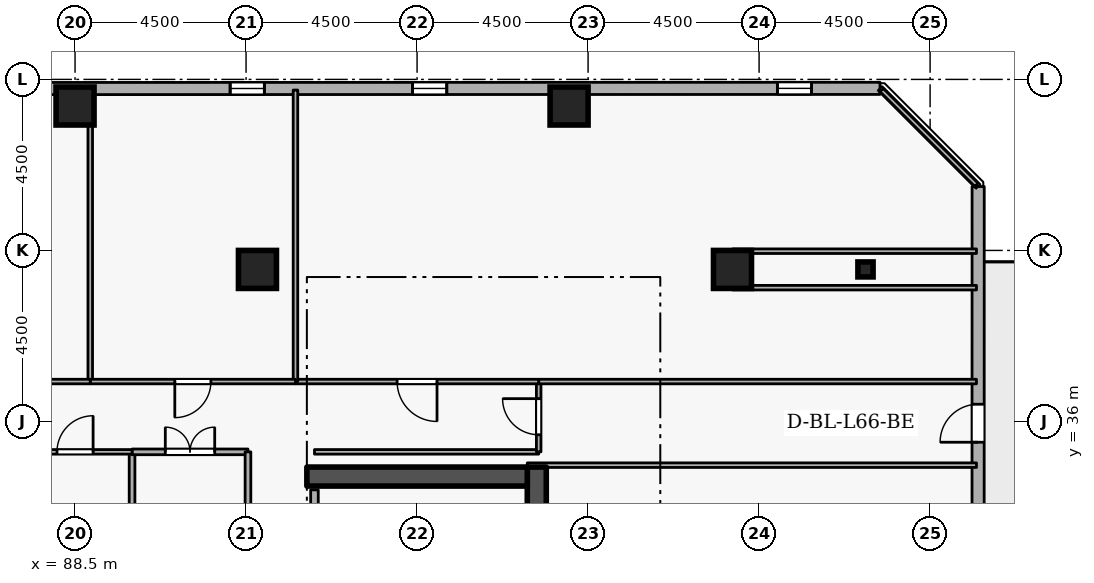
"""IFC4 building model, lengths in metres.
Left out: names, types, materials, properties, quantities, classifications, styles, units other than length and angle.
Written with IfcOpenShell. Run it as: python <this file> out.ifc"""

import sys

from ifc_helpers import new_model, si_unit, direction, frame, frame_2d, origin, origin_2d, place, context, subcontext, project, spatial, rectangle, i_section, extrude, element, fill, save


model = new_model("IFC4")
c1 = context("Model", 3, precision=1e-05, world=origin(), true_north=direction((0.0, 1.0)))
c2 = subcontext(c1, "Body", "Model", "MODEL_VIEW")
j1 = project(units=[si_unit("LENGTHUNIT", "METRE"), si_unit("PLANEANGLEUNIT", "RADIAN")], contexts=[c1])
p1 = place(None, origin())
s1 = spatial("IfcSite", under=j1, at=p1, CompositionType="ELEMENT")
p2 = place(p1, origin())
s2 = spatial("IfcBuilding", under=s1, at=p2, CompositionType="ELEMENT")
p3 = place(p2, frame((0.0, 0.0, 247.5)))
s3 = spatial("IfcBuildingStorey", under=s2, at=p3, CompositionType="ELEMENT", Elevation=247.5)
p4 = place(p3, frame((100.65, 19.2, 0.0), z_axis=(0.0, 0.0, 1.0), x_axis=(0.0, 1.0, 0.0)))
e1 = element("IfcWall", 1, at=p4, inside=s3, PredefinedType="SHEAR", context=c2, shape_type="SweptSolid", body=[
    extrude(rectangle(XDim=15.6, YDim=0.5, at=frame_2d((7.8, 0.0))), origin(), (0.0, 0.0, 1.0), 3.6),
])
p5 = place(p3, frame((94.6, 34.55, 0.0), z_axis=(0.0, 0.0, 1.0), x_axis=(1.0, 0.0, 0.0)))
e2 = element("IfcWall", 2, at=p5, inside=s3, PredefinedType="SHEAR", context=c2, shape_type="SweptSolid", body=[
    extrude(rectangle(XDim=5.8, YDim=0.5, at=frame_2d((2.9, 0.0))), origin(), (0.0, 0.0, 1.0), 3.6),
])
for number, where, z_axis, x_axis in (
    (3, (105.8, 40.0, 0.0), (0.0, 0.0, 1.0), (1.0, 0.0, 0.0)),
    (4, (101.5, 44.3, 0.0), (0.0, 0.0, 1.0), (1.0, 0.0, 0.0)),
    (5, (88.5, 44.3, 0.0), (0.0, 0.0, 1.0), (1.0, 0.0, 0.0)),
    (6, (93.3, 40.0, 0.0), (0.0, 0.0, 1.0), (1.0, 0.0, 0.0)),
):
    element("IfcColumn", number, at=place(p3, frame(where, z_axis=z_axis, x_axis=x_axis)), inside=s3, PredefinedType="COLUMN", context=c2, shape_type="SweptSolid", body=[
        extrude(rectangle(XDim=1.0, YDim=1.0, at=origin_2d()), origin(), (0.0, 0.0, 1.0), 3.6),
    ])
p6 = place(p3, frame((109.3, 40.0, 0.0), z_axis=(0.0, 0.0, 1.0), x_axis=(1.0, 0.0, 0.0)))
e7 = element("IfcColumn", 7, at=p6, inside=s3, PredefinedType="COLUMN", context=c2, shape_type="SweptSolid", body=[
    extrude(i_section(OverallWidth=0.399, OverallDepth=0.394, WebThickness=0.023, FlangeThickness=0.037, FilletRadius=0.015, at=origin_2d()), origin(), (0.0, 0.0, 1.0), 3.6),
])
p7 = place(p3, frame((112.257, 8.025, 0.0), z_axis=(0.0, 0.0, 1.0), x_axis=(0.000214431216, 0.99999997701, 0.0)))
e8 = element("IfcWall", 8, at=p7, inside=s3, PredefinedType="STANDARD", context=c2, shape_type="SweptSolid", body=[
    extrude(rectangle(XDim=34.156, YDim=0.32, at=frame_2d((17.078, 0.0))), origin(), (0.0, 0.0, 1.0), 2.7),
])
p8 = place(p7, frame((27.428, 0.0, 0.0)))
e9 = element("IfcOpeningElement", 9, at=p8, cuts=e8, PredefinedType="OPENING", context=c2, shape_type="SweptSolid", body=[
    extrude(rectangle(XDim=1.0, YDim=2.08, at=frame_2d((0.5, 1.04))), frame((0.0, 0.17, 0.0), z_axis=(0.0, -1.0, 0.0), x_axis=(1.0, 0.0, 0.0)), (0.0, 0.0, 1.0), 0.34),
])
p9 = place(p7, frame((1.8, 0.0, 0.72)))
e10 = element("IfcOpeningElement", 10, at=p9, cuts=e8, PredefinedType="OPENING", context=c2, shape_type="SweptSolid", body=[
    extrude(rectangle(XDim=0.9, YDim=1.75, at=frame_2d((0.45, 0.875))), frame((0.0, 0.17, 0.0), z_axis=(0.0, -1.0, 0.0), x_axis=(1.0, 0.0, 0.0)), (0.0, 0.0, 1.0), 0.34),
])
p10 = place(p7, frame((11.4, 0.0, 0.72)))
e11 = element("IfcOpeningElement", 11, at=p10, cuts=e8, PredefinedType="OPENING", context=c2, shape_type="SweptSolid", body=[
    extrude(rectangle(XDim=0.9, YDim=1.75, at=frame_2d((0.45, 0.875))), frame((0.0, 0.17, 0.0), z_axis=(0.0, -1.0, 0.0), x_axis=(1.0, 0.0, 0.0)), (0.0, 0.0, 1.0), 0.34),
])
p11 = place(p7, frame((16.2, 0.0, 0.72)))
e12 = element("IfcOpeningElement", 12, at=p11, cuts=e8, PredefinedType="OPENING", context=c2, shape_type="SweptSolid", body=[
    extrude(rectangle(XDim=0.9, YDim=1.75, at=frame_2d((0.45, 0.875))), frame((0.0, 0.17, 0.0), z_axis=(0.0, -1.0, 0.0), x_axis=(1.0, 0.0, 0.0)), (0.0, 0.0, 1.0), 0.34),
])
p12 = place(p7, frame((21.0, 0.0, 0.72)))
e13 = element("IfcOpeningElement", 13, at=p12, cuts=e8, PredefinedType="OPENING", context=c2, shape_type="SweptSolid", body=[
    extrude(rectangle(XDim=0.9, YDim=1.75, at=frame_2d((0.45, 0.875))), frame((0.0, 0.17, 0.0), z_axis=(0.0, -1.0, 0.0), x_axis=(1.0, 0.0, 0.0)), (0.0, 0.0, 1.0), 0.34),
])
p13 = place(p3, frame((109.681, 44.765, 0.0), z_axis=(0.0, 0.0, 1.0), x_axis=(-0.99999997701, -0.000214431216, 0.0)))
e14 = element("IfcWall", 14, at=p13, inside=s3, PredefinedType="STANDARD", context=c2, shape_type="SweptSolid", body=[
    extrude(rectangle(XDim=34.156, YDim=0.32, at=frame_2d((17.078, 0.0))), origin(), (0.0, 0.0, 1.0), 2.7),
])
p14 = place(p13, frame((1.8, 0.0, 0.72)))
e15 = element("IfcOpeningElement", 15, at=p14, cuts=e14, PredefinedType="OPENING", context=c2, shape_type="SweptSolid", body=[
    extrude(rectangle(XDim=0.9, YDim=1.75, at=frame_2d((0.45, 0.875))), frame((0.0, 0.17, 0.0), z_axis=(0.0, -1.0, 0.0), x_axis=(1.0, 0.0, 0.0)), (0.0, 0.0, 1.0), 0.34),
])
p15 = place(p13, frame((11.4, 0.0, 0.72)))
e16 = element("IfcOpeningElement", 16, at=p15, cuts=e14, PredefinedType="OPENING", context=c2, shape_type="SweptSolid", body=[
    extrude(rectangle(XDim=0.9, YDim=1.75, at=frame_2d((0.45, 0.875))), frame((0.0, 0.17, 0.0), z_axis=(0.0, -1.0, 0.0), x_axis=(1.0, 0.0, 0.0)), (0.0, 0.0, 1.0), 0.34),
])
p16 = place(p13, frame((16.2, 0.0, 0.72)))
e17 = element("IfcOpeningElement", 17, at=p16, cuts=e14, PredefinedType="OPENING", context=c2, shape_type="SweptSolid", body=[
    extrude(rectangle(XDim=0.9, YDim=1.75, at=frame_2d((0.45, 0.875))), frame((0.0, 0.17, 0.0), z_axis=(0.0, -1.0, 0.0), x_axis=(1.0, 0.0, 0.0)), (0.0, 0.0, 1.0), 0.34),
])
p17 = place(p13, frame((30.6, 0.0, 0.72)))
e18 = element("IfcOpeningElement", 18, at=p17, cuts=e14, PredefinedType="OPENING", context=c2, shape_type="SweptSolid", body=[
    extrude(rectangle(XDim=0.9, YDim=1.75, at=frame_2d((0.45, 0.875))), frame((0.0, 0.17, 0.0), z_axis=(0.0, -1.0, 0.0), x_axis=(1.0, 0.0, 0.0)), (0.0, 0.0, 1.0), 0.34),
])
p18 = place(p3, frame((94.8, 32.0, 0.0), z_axis=(0.0, 0.0, 1.0), x_axis=(0.0, 1.0, 0.0)))
e19 = element("IfcWall", 19, at=p18, inside=s3, PredefinedType="STANDARD", context=c2, shape_type="SweptSolid", body=[
    extrude(rectangle(XDim=2.2, YDim=0.2, at=frame_2d((1.1, 0.0))), origin(), (0.0, 0.0, 1.0), 3.34),
])
p19 = place(p18, frame((0.525, 0.0, 0.0)))
e20 = element("IfcOpeningElement", 20, at=p19, cuts=e19, PredefinedType="OPENING", context=c2, shape_type="SweptSolid", body=[
    extrude(rectangle(XDim=1.15, YDim=2.1, at=frame_2d((0.575, 1.05))), frame((0.0, 0.11, 0.0), z_axis=(0.0, -1.0, 0.0), x_axis=(1.0, 0.0, 0.0)), (0.0, 0.0, 1.0), 0.22),
])
p20 = place(p3, frame((94.8, 35.2, 0.0), z_axis=(0.0, 0.0, 1.0), x_axis=(1.0, 0.0, 0.0)))
e21 = element("IfcWall", 21, at=p20, inside=s3, PredefinedType="PARTITIONING", context=c2, shape_type="SweptSolid", body=[
    extrude(rectangle(XDim=5.9, YDim=0.12, at=frame_2d((2.95, 0.0))), origin(), (0.0, 0.0, 1.0), 3.34),
])
p21 = place(p3, frame((100.7, 35.2, 0.0), z_axis=(0.0, 0.0, 1.0), x_axis=(0.0, 1.0, 0.0)))
e22 = element("IfcWall", 22, at=p21, inside=s3, PredefinedType="PARTITIONING", context=c2, shape_type="SweptSolid", body=[
    extrude(rectangle(XDim=1.85, YDim=0.12, at=frame_2d((0.925, 0.0))), origin(), (0.0, 0.0, 1.0), 3.34),
])
p22 = place(p21, frame((0.45, 0.0, 0.0)))
e23 = element("IfcOpeningElement", 23, at=p22, cuts=e22, PredefinedType="OPENING", context=c2, shape_type="SweptSolid", body=[
    extrude(rectangle(XDim=0.95, YDim=2.1, at=frame_2d((0.475, 1.05))), frame((0.0, 0.07, 0.0), z_axis=(0.0, -1.0, 0.0), x_axis=(1.0, 0.0, 0.0)), (0.0, 0.0, 1.0), 0.14),
])
p23 = place(p3, frame((100.7, 37.05, 0.0), z_axis=(0.0, 0.0, 1.0), x_axis=(1.0, 0.0, 0.0)))
e24 = element("IfcWall", 24, at=p23, inside=s3, PredefinedType="PARTITIONING", context=c2, shape_type="SweptSolid", body=[
    extrude(rectangle(XDim=11.52, YDim=0.12, at=frame_2d((5.76, 0.0))), origin(), (0.0, 0.0, 1.0), 3.34),
])
p24 = place(p3, frame((112.22, 34.85, 0.0), z_axis=(0.0, 0.0, 1.0), x_axis=(-1.0, 0.0, 0.0)))
e25 = element("IfcWall", 25, at=p24, inside=s3, PredefinedType="PARTITIONING", context=c2, shape_type="SweptSolid", body=[
    extrude(rectangle(XDim=11.82, YDim=0.12, at=frame_2d((5.91, 0.0))), origin(), (0.0, 0.0, 1.0), 2.545),
])
p25 = place(p3, frame((100.7, 37.05, 0.0), z_axis=(0.0, 0.0, 1.0), x_axis=(-1.0, 0.0, 0.0)))
e26 = element("IfcWall", 26, at=p25, inside=s3, PredefinedType="PARTITIONING", context=c2, shape_type="SweptSolid", body=[
    extrude(rectangle(XDim=6.4, YDim=0.12, at=frame_2d((3.2, 0.0))), origin(), (0.0, 0.0, 1.0), 3.34),
])
p26 = place(p25, frame((2.675, 0.0, 0.0)))
e27 = element("IfcOpeningElement", 27, at=p26, cuts=e26, PredefinedType="OPENING", context=c2, shape_type="SweptSolid", body=[
    extrude(rectangle(XDim=1.05, YDim=2.1, at=frame_2d((0.525, 1.05))), frame((0.0, 0.07, 0.0), z_axis=(0.0, -1.0, 0.0), x_axis=(1.0, 0.0, 0.0)), (0.0, 0.0, 1.0), 0.14),
])
p27 = place(p3, frame((94.3, 37.05, 0.0), z_axis=(0.0, 0.0, 1.0), x_axis=(0.0, 1.0, 0.0)))
e28 = element("IfcWall", 28, at=p27, inside=s3, PredefinedType="PARTITIONING", context=c2, shape_type="SweptSolid", body=[
    extrude(rectangle(XDim=7.67, YDim=0.12, at=frame_2d((3.835, 0.0))), origin(), (0.0, 0.0, 1.0), 3.34),
])
p28 = place(p3, frame((109.725, 44.72, 0.0), z_axis=(0.0, 0.0, 1.0), x_axis=(0.707106781187, -0.707106781187, 0.0)))
e29 = element("IfcWall", 29, at=p28, inside=s3, PredefinedType="PARTITIONING", context=c2, shape_type="SweptSolid", body=[
    extrude(rectangle(XDim=3.528, YDim=0.12, at=frame_2d((1.764, 0.0))), origin(), (0.0, 0.0, 1.0), 3.34),
])
for number, where, z_axis, x_axis in (
    (30, (112.22, 40.48, 0.0), (0.0, 0.0, 1.0), (-1.0, 0.0, 0.0)),
    (31, (105.8, 39.52, 0.0), (0.0, 0.0, 1.0), (1.0, 0.0, 0.0)),
):
    element("IfcWall", number, at=place(p3, frame(where, z_axis=z_axis, x_axis=x_axis)), inside=s3, PredefinedType="PARTITIONING", context=c2, shape_type="SweptSolid", body=[
        extrude(rectangle(XDim=6.42, YDim=0.12, at=frame_2d((3.21, 0.0))), origin(), (0.0, 0.0, 1.0), 3.34),
    ])
p29 = place(p3, frame((88.9, 37.05, 0.0), z_axis=(0.0, 0.0, 1.0), x_axis=(0.0, 1.0, 0.0)))
e32 = element("IfcWall", 32, at=p29, inside=s3, PredefinedType="PARTITIONING", context=c2, shape_type="SweptSolid", body=[
    extrude(rectangle(XDim=7.25, YDim=0.12, at=frame_2d((3.625, 0.0))), origin(), (0.0, 0.0, 1.0), 3.34),
])
p30 = place(p3, frame((94.3, 37.05, 0.0), z_axis=(0.0, 0.0, 1.0), x_axis=(-1.0, 0.0, 0.0)))
e33 = element("IfcWall", 33, at=p30, inside=s3, PredefinedType="PARTITIONING", context=c2, shape_type="SweptSolid", body=[
    extrude(rectangle(XDim=5.4, YDim=0.12, at=frame_2d((2.7, 0.0))), origin(), (0.0, 0.0, 1.0), 3.34),
])
p31 = place(p30, frame((2.225, 0.0, 0.0)))
e34 = element("IfcOpeningElement", 34, at=p31, cuts=e33, PredefinedType="OPENING", context=c2, shape_type="SweptSolid", body=[
    extrude(rectangle(XDim=0.95, YDim=2.1, at=frame_2d((0.475, 1.05))), frame((0.0, 0.07, 0.0), z_axis=(0.0, -1.0, 0.0), x_axis=(1.0, 0.0, 0.0)), (0.0, 0.0, 1.0), 0.14),
])
p32 = place(p3, frame((88.9, 37.05, 0.0), z_axis=(0.0, 0.0, 1.0), x_axis=(-1.0, 0.0, 0.0)))
e35 = element("IfcWall", 35, at=p32, inside=s3, PredefinedType="PARTITIONING", context=c2, shape_type="SweptSolid", body=[
    extrude(rectangle(XDim=4.8, YDim=0.12, at=frame_2d((2.4, 0.0))), origin(), (0.0, 0.0, 1.0), 3.34),
])
p33 = place(p32, frame((1.925, 0.0, 0.0)))
e36 = element("IfcOpeningElement", 36, at=p33, cuts=e35, PredefinedType="OPENING", context=c2, shape_type="SweptSolid", body=[
    extrude(rectangle(XDim=0.95, YDim=2.1, at=frame_2d((0.475, 1.05))), frame((0.0, 0.07, 0.0), z_axis=(0.0, -1.0, 0.0), x_axis=(1.0, 0.0, 0.0)), (0.0, 0.0, 1.0), 0.14),
])
p34 = place(p3, frame((90.0, 32.2, 0.0), z_axis=(0.0, 0.0, 1.0), x_axis=(0.0, 1.0, 0.0)))
e37 = element("IfcWall", 37, at=p34, inside=s3, PredefinedType="PARTITIONING", context=c2, shape_type="SweptSolid", body=[
    extrude(rectangle(XDim=3.0, YDim=0.15, at=frame_2d((1.5, 0.0))), origin(), (0.0, 0.0, 1.0), 3.34),
])
p35 = place(p3, frame((90.0, 35.2, 0.0), z_axis=(0.0, 0.0, 1.0), x_axis=(1.0, 0.0, 0.0)))
e38 = element("IfcWall", 38, at=p35, inside=s3, PredefinedType="PARTITIONING", context=c2, shape_type="SweptSolid", body=[
    extrude(rectangle(XDim=3.05, YDim=0.15, at=frame_2d((1.525, 0.0))), origin(), (0.0, 0.0, 1.0), 3.34),
])
p36 = place(p35, frame((0.875, 0.0, 0.0)))
e39 = element("IfcOpeningElement", 39, at=p36, cuts=e38, PredefinedType="OPENING", context=c2, shape_type="SweptSolid", body=[
    extrude(rectangle(XDim=1.3, YDim=2.12, at=frame_2d((0.65, 1.06))), frame((0.0, 0.085, 0.0), z_axis=(0.0, -1.0, 0.0), x_axis=(1.0, 0.0, 0.0)), (0.0, 0.0, 1.0), 0.17),
])
p37 = place(p3, frame((93.05, 35.2, 0.0), z_axis=(0.0, 0.0, 1.0), x_axis=(0.0, -1.0, 0.0)))
e40 = element("IfcWall", 40, at=p37, inside=s3, PredefinedType="PARTITIONING", context=c2, shape_type="SweptSolid", body=[
    extrude(rectangle(XDim=3.0, YDim=0.15, at=frame_2d((1.5, 0.0))), origin(), (0.0, 0.0, 1.0), 3.34),
])
p38 = place(p3, frame((87.0, 35.2, 0.0), z_axis=(0.0, 0.0, 1.0), x_axis=(1.0, 0.0, 0.0)))
e41 = element("IfcWall", 41, at=p38, inside=s3, PredefinedType="PARTITIONING", context=c2, shape_type="SweptSolid", body=[
    extrude(rectangle(XDim=3.0, YDim=0.12, at=frame_2d((1.5, 0.0))), origin(), (0.0, 0.0, 1.0), 3.34),
])
p39 = place(p38, frame((1.025, 0.0, 0.0)))
e42 = element("IfcOpeningElement", 42, at=p39, cuts=e41, PredefinedType="OPENING", context=c2, shape_type="SweptSolid", body=[
    extrude(rectangle(XDim=0.95, YDim=2.1, at=frame_2d((0.475, 1.05))), frame((0.0, 0.07, 0.0), z_axis=(0.0, -1.0, 0.0), x_axis=(1.0, 0.0, 0.0)), (0.0, 0.0, 1.0), 0.14),
])
p40 = place(p8, origin())
e43 = element("IfcDoor", 43, at=p40, inside=s3, OperationType="SINGLE_SWING_LEFT", PredefinedType="DOOR", context=c2, shape_type="SweptSolid", body=[
    extrude(rectangle(XDim=1.0, YDim=2.08, at=frame_2d((0.5, 1.04))), frame((0.0, 0.025, 0.0), z_axis=(0.0, -1.0, 0.0), x_axis=(1.0, 0.0, 0.0)), (0.0, 0.0, 1.0), 0.05),
])
fill(e9, e43)
p41 = place(p14, origin())
e44 = element("IfcWindow", 44, at=p41, inside=s3, PartitioningType="SINGLE_PANEL", PredefinedType="WINDOW", context=c2, shape_type="SweptSolid", body=[
    extrude(rectangle(XDim=0.9, YDim=1.75, at=frame_2d((0.45, 0.875))), frame((0.0, 0.03, 0.0), z_axis=(0.0, -1.0, 0.0), x_axis=(1.0, 0.0, 0.0)), (0.0, 0.0, 1.0), 0.06),
])
fill(e15, e44)
p42 = place(p15, origin())
e45 = element("IfcWindow", 45, at=p42, inside=s3, PartitioningType="SINGLE_PANEL", PredefinedType="WINDOW", context=c2, shape_type="SweptSolid", body=[
    extrude(rectangle(XDim=0.9, YDim=1.75, at=frame_2d((0.45, 0.875))), frame((0.0, 0.03, 0.0), z_axis=(0.0, -1.0, 0.0), x_axis=(1.0, 0.0, 0.0)), (0.0, 0.0, 1.0), 0.06),
])
fill(e16, e45)
p43 = place(p16, origin())
e46 = element("IfcWindow", 46, at=p43, inside=s3, PartitioningType="SINGLE_PANEL", PredefinedType="WINDOW", context=c2, shape_type="SweptSolid", body=[
    extrude(rectangle(XDim=0.9, YDim=1.75, at=frame_2d((0.45, 0.875))), frame((0.0, 0.03, 0.0), z_axis=(0.0, -1.0, 0.0), x_axis=(1.0, 0.0, 0.0)), (0.0, 0.0, 1.0), 0.06),
])
fill(e17, e46)
p44 = place(p22, origin())
e47 = element("IfcDoor", 47, at=p44, inside=s3, OperationType="SINGLE_SWING_RIGHT", PredefinedType="DOOR", context=c2, shape_type="SweptSolid", body=[
    extrude(rectangle(XDim=0.95, YDim=2.1, at=frame_2d((0.475, 1.05))), frame((0.0, 0.025, 0.0), z_axis=(0.0, -1.0, 0.0), x_axis=(1.0, 0.0, 0.0)), (0.0, 0.0, 1.0), 0.05),
])
fill(e23, e47)
p45 = place(p26, origin())
e48 = element("IfcDoor", 48, at=p45, inside=s3, OperationType="SINGLE_SWING_LEFT", PredefinedType="DOOR", context=c2, shape_type="SweptSolid", body=[
    extrude(rectangle(XDim=1.05, YDim=2.1, at=frame_2d((0.525, 1.05))), frame((0.0, 0.025, 0.0), z_axis=(0.0, -1.0, 0.0), x_axis=(1.0, 0.0, 0.0)), (0.0, 0.0, 1.0), 0.05),
])
fill(e27, e48)
p46 = place(p31, origin())
e49 = element("IfcDoor", 49, at=p46, inside=s3, OperationType="SINGLE_SWING_RIGHT", PredefinedType="DOOR", context=c2, shape_type="SweptSolid", body=[
    extrude(rectangle(XDim=0.95, YDim=2.1, at=frame_2d((0.475, 1.05))), frame((0.0, 0.025, 0.0), z_axis=(0.0, -1.0, 0.0), x_axis=(1.0, 0.0, 0.0)), (0.0, 0.0, 1.0), 0.05),
])
fill(e34, e49)
p47 = place(p36, origin())
e50 = element("IfcDoor", 50, at=p47, inside=s3, OperationType="DOUBLE_DOOR_SINGLE_SWING", PredefinedType="DOOR", context=c2, shape_type="SweptSolid", body=[
    extrude(rectangle(XDim=1.3, YDim=2.12, at=frame_2d((0.65, 1.06))), frame((0.0, 0.025, 0.0), z_axis=(0.0, -1.0, 0.0), x_axis=(1.0, 0.0, 0.0)), (0.0, 0.0, 1.0), 0.05),
])
fill(e39, e50)
p48 = place(p39, origin())
e51 = element("IfcDoor", 51, at=p48, inside=s3, OperationType="SINGLE_SWING_RIGHT", PredefinedType="DOOR", context=c2, shape_type="SweptSolid", body=[
    extrude(rectangle(XDim=0.95, YDim=2.1, at=frame_2d((0.475, 1.05))), frame((0.0, 0.025, 0.0), z_axis=(0.0, -1.0, 0.0), x_axis=(1.0, 0.0, 0.0)), (0.0, 0.0, 1.0), 0.05),
])
fill(e42, e51)
save(model, sys.argv[1])
